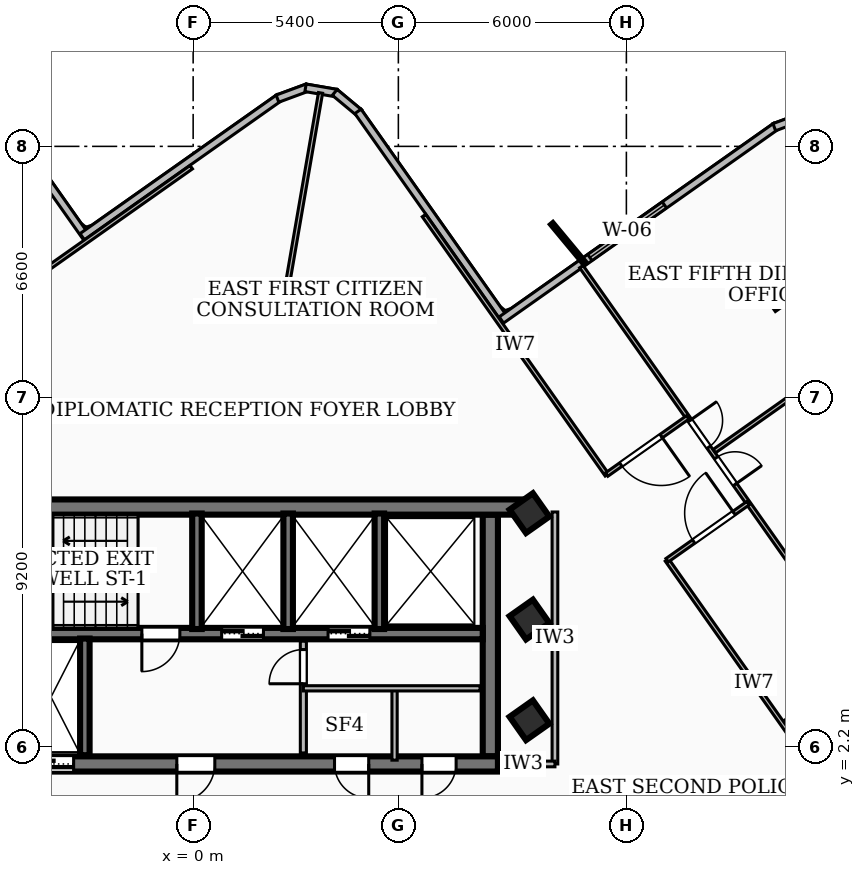
"""IFC4 building model, lengths in metres.
Left out: names, types, materials, properties, quantities, classifications, styles, units other than length and angle.
Written with IfcOpenShell. Run it as: python <this file> out.ifc"""

import sys

from ifc_helpers import new_model, si_unit, direction, frame, frame_2d, origin, origin_2d, place, context, subcontext, project, spatial, rectangle, i_section, extrude, element, fill, save


model = new_model("IFC4")
c1 = context("Model", 3, precision=1e-05, world=origin(), true_north=direction((0.0, 1.0)))
c2 = subcontext(c1, "Body", "Model", "MODEL_VIEW")
j1 = project(units=[si_unit("LENGTHUNIT", "METRE"), si_unit("PLANEANGLEUNIT", "RADIAN")], contexts=[c1])
p1 = place(None, origin())
s1 = spatial("IfcSite", under=j1, at=p1, CompositionType="ELEMENT")
p2 = place(p1, origin())
s2 = spatial("IfcBuilding", under=s1, at=p2, CompositionType="ELEMENT")
p3 = place(p2, frame((0.0, 0.0, 222.3)))
s3 = spatial("IfcBuildingStorey", under=s2, at=p3, CompositionType="ELEMENT", Elevation=222.3)
p4 = place(p3, frame((-8.78, 8.51, 0.0), z_axis=(0.0, 0.0, 1.0), x_axis=(1.0, 0.0, 0.0)))
e1 = element("IfcWall", 1, at=p4, inside=s3, PredefinedType="SHEAR", context=c2, shape_type="SweptSolid", body=[
    extrude(rectangle(XDim=17.56, YDim=0.4, at=frame_2d((8.78, 0.0))), origin(), (0.0, 0.0, 1.0), 3.14),
])
p5 = place(p3, frame((8.02, 1.75, 0.0), z_axis=(0.0, 0.0, 1.0), x_axis=(-1.0, 0.0, 0.0)))
e2 = element("IfcWall", 2, at=p5, inside=s3, PredefinedType="SHEAR", context=c2, shape_type="SweptSolid", body=[
    extrude(rectangle(XDim=16.04, YDim=0.4, at=frame_2d((8.02, 0.0))), origin(), (0.0, 0.0, 1.0), 3.14),
])
p6 = place(p5, frame((7.45, 0.0, 0.0)))
e3 = element("IfcOpeningElement", 3, at=p6, cuts=e2, PredefinedType="OPENING", context=c2, shape_type="SweptSolid", body=[
    extrude(rectangle(XDim=1.0, YDim=2.1, at=frame_2d((0.5, 1.05))), frame((0.0, 0.21, 0.0), z_axis=(0.0, -1.0, 0.0), x_axis=(1.0, 0.0, 0.0)), (0.0, 0.0, 1.0), 0.42),
])
p7 = place(p5, frame((14.285, 0.0, 0.0)))
e4 = element("IfcOpeningElement", 4, at=p7, cuts=e2, PredefinedType="OPENING", context=c2, shape_type="SweptSolid", body=[
    extrude(rectangle(XDim=1.05, YDim=2.15, at=frame_2d((0.525, 1.075))), frame((0.0, 0.21, 0.0), z_axis=(0.0, -1.0, 0.0), x_axis=(1.0, 0.0, 0.0)), (0.0, 0.0, 1.0), 0.42),
])
p8 = place(p5, frame((12.725, 0.0, 0.0)))
e5 = element("IfcOpeningElement", 5, at=p8, cuts=e2, PredefinedType="OPENING", context=c2, shape_type="SweptSolid", body=[
    extrude(rectangle(XDim=1.05, YDim=2.15, at=frame_2d((0.525, 1.075))), frame((0.0, 0.21, 0.0), z_axis=(0.0, -1.0, 0.0), x_axis=(1.0, 0.0, 0.0)), (0.0, 0.0, 1.0), 0.42),
])
p9 = place(p5, frame((11.165, 0.0, 0.0)))
e6 = element("IfcOpeningElement", 6, at=p9, cuts=e2, PredefinedType="OPENING", context=c2, shape_type="SweptSolid", body=[
    extrude(rectangle(XDim=1.05, YDim=2.15, at=frame_2d((0.525, 1.075))), frame((0.0, 0.21, 0.0), z_axis=(0.0, -1.0, 0.0), x_axis=(1.0, 0.0, 0.0)), (0.0, 0.0, 1.0), 0.42),
])
p10 = place(p5, frame((3.4, 0.0, 0.0)))
e7 = element("IfcOpeningElement", 7, at=p10, cuts=e2, PredefinedType="OPENING", context=c2, shape_type="SweptSolid", body=[
    extrude(rectangle(XDim=0.9, YDim=2.06, at=frame_2d((0.45, 1.03))), frame((0.0, 0.21, 0.0), z_axis=(0.0, -1.0, 0.0), x_axis=(1.0, 0.0, 0.0)), (0.0, 0.0, 1.0), 0.42),
])
p11 = place(p5, frame((1.1, 0.0, 0.0)))
e8 = element("IfcOpeningElement", 8, at=p11, cuts=e2, PredefinedType="OPENING", context=c2, shape_type="SweptSolid", body=[
    extrude(rectangle(XDim=0.9, YDim=2.06, at=frame_2d((0.45, 1.03))), frame((0.0, 0.21, 0.0), z_axis=(0.0, -1.0, 0.0), x_axis=(1.0, 0.0, 0.0)), (0.0, 0.0, 1.0), 0.42),
])
p12 = place(p3, frame((7.82, 8.31, 0.0), z_axis=(0.0, 0.0, 1.0), x_axis=(0.0, -1.0, 0.0)))
e9 = element("IfcWall", 9, at=p12, inside=s3, PredefinedType="SHEAR", context=c2, shape_type="SweptSolid", body=[
    extrude(rectangle(XDim=6.36, YDim=0.4, at=frame_2d((3.18, 0.0))), origin(), (0.0, 0.0, 1.0), 3.14),
])
p13 = place(p3, frame((7.62, 5.18, 0.0), z_axis=(0.0, 0.0, 1.0), x_axis=(-1.0, 0.0, 0.0)))
e10 = element("IfcWall", 10, at=p13, inside=s3, PredefinedType="SOLIDWALL", context=c2, shape_type="SweptSolid", body=[
    extrude(rectangle(XDim=15.24, YDim=0.3, at=frame_2d((7.62, 0.0))), origin(), (0.0, 0.0, 1.0), 3.14),
])
p14 = place(p13, frame((5.77, 0.0, 0.0)))
e11 = element("IfcOpeningElement", 11, at=p14, cuts=e10, PredefinedType="OPENING", context=c2, shape_type="SweptSolid", body=[
    extrude(rectangle(XDim=1.1, YDim=2.15, at=frame_2d((0.55, 1.075))), frame((0.0, 0.16, 0.0), z_axis=(0.0, -1.0, 0.0), x_axis=(1.0, 0.0, 0.0)), (0.0, 0.0, 1.0), 0.32),
])
p15 = place(p13, frame((2.97, 0.0, 0.0)))
e12 = element("IfcOpeningElement", 12, at=p15, cuts=e10, PredefinedType="OPENING", context=c2, shape_type="SweptSolid", body=[
    extrude(rectangle(XDim=1.1, YDim=2.15, at=frame_2d((0.55, 1.075))), frame((0.0, 0.16, 0.0), z_axis=(0.0, -1.0, 0.0), x_axis=(1.0, 0.0, 0.0)), (0.0, 0.0, 1.0), 0.32),
])
p16 = place(p13, frame((7.97, 0.0, 0.0)))
e13 = element("IfcOpeningElement", 13, at=p16, cuts=e10, PredefinedType="OPENING", context=c2, shape_type="SweptSolid", body=[
    extrude(rectangle(XDim=1.0, YDim=2.1, at=frame_2d((0.5, 1.05))), frame((0.0, 0.16, 0.0), z_axis=(0.0, -1.0, 0.0), x_axis=(1.0, 0.0, 0.0)), (0.0, 0.0, 1.0), 0.32),
])
for number, where, z_axis, x_axis in (
    (14, (0.1, 5.3, 0.0), (0.0, 0.0, 1.0), (0.0, 1.0, 0.0)),
    (15, (2.5, 5.3, 0.0), (0.0, 0.0, 1.0), (0.0, 1.0, 0.0)),
    (16, (4.9, 5.3, 0.0), (0.0, 0.0, 1.0), (0.0, 1.0, 0.0)),
):
    element("IfcWall", number, at=place(p3, frame(where, z_axis=z_axis, x_axis=x_axis)), inside=s3, PredefinedType="SOLIDWALL", context=c2, shape_type="SweptSolid", body=[
        extrude(rectangle(XDim=3.04, YDim=0.25, at=frame_2d((1.52, 0.0))), origin(), (0.0, 0.0, 1.0), 3.14),
    ])
p17 = place(p3, frame((-2.85, 1.98, 0.0), z_axis=(0.0, 0.0, 1.0), x_axis=(0.0, 1.0, 0.0)))
e17 = element("IfcWall", 17, at=p17, inside=s3, PredefinedType="SOLIDWALL", context=c2, shape_type="SweptSolid", body=[
    extrude(rectangle(XDim=3.07, YDim=0.25, at=frame_2d((1.535, 0.0))), origin(), (0.0, 0.0, 1.0), 3.14),
])
for number, where, z_axis, x_axis in (
    (18, (8.85, 2.9, 0.0), (0.0, 0.0, 1.0), (0.817, 0.576, 0.0)),
    (19, (8.85, 5.55, 0.0), (0.0, 0.0, 1.0), (0.817, 0.576, 0.0)),
    (20, (8.85, 8.35, 0.0), (0.0, 0.0, 1.0), (0.817, 0.576, 0.0)),
):
    element("IfcColumn", number, at=place(p3, frame(where, z_axis=z_axis, x_axis=x_axis)), inside=s3, PredefinedType="COLUMN", context=c2, shape_type="SweptSolid", body=[
        extrude(rectangle(XDim=0.75, YDim=0.75, at=origin_2d()), origin(), (0.0, 0.0, 1.0), 3.42),
    ])
p18 = place(p3, frame((15.234, 14.209, 0.0), z_axis=(0.0, 0.0, 1.0), x_axis=(0.817144898335, 0.57643231617, 0.0)))
e21 = element("IfcColumn", 21, at=p18, inside=s3, PredefinedType="COLUMN", context=c2, shape_type="SweptSolid", body=[
    extrude(i_section(OverallWidth=0.418, OverallDepth=0.927, WebThickness=0.019, FlangeThickness=0.032, at=origin_2d()), origin(), (0.0, 0.0, 1.0), 3.42),
])
p19 = place(p3, frame((-5.484, 19.397, 0.0), z_axis=(0.0, 0.0, 1.0), x_axis=(0.576451897958, -0.817131084551, 0.0)))
e22 = element("IfcWall", 22, at=p19, inside=s3, PredefinedType="SOLIDWALL", context=c2, shape_type="SweptSolid", body=[
    extrude(rectangle(XDim=4.642, YDim=0.2, at=frame_2d((2.321, 0.0))), origin(), (0.0, 0.0, 1.0), 3.14),
])
p20 = place(p3, frame((-2.919, 15.623, 0.0), z_axis=(0.0, 0.0, 1.0), x_axis=(0.817050016192, 0.576566796686, 0.0)))
e23 = element("IfcWall", 23, at=p20, inside=s3, PredefinedType="SOLIDWALL", context=c2, shape_type="SweptSolid", body=[
    extrude(rectangle(XDim=6.341, YDim=0.2, at=frame_2d((3.17, 0.0))), origin(), (0.0, 0.0, 1.0), 3.14),
])
p21 = place(p3, frame((2.219, 19.256, 0.0), z_axis=(0.0, 0.0, 1.0), x_axis=(0.938243551417, 0.345975487894, 0.0)))
e24 = element("IfcWall", 24, at=p21, inside=s3, PredefinedType="SOLIDWALL", context=c2, shape_type="SweptSolid", body=[
    extrude(rectangle(XDim=0.838, YDim=0.2, at=frame_2d((0.419, 0.0))), origin(), (0.0, 0.0, 1.0), 3.14),
])
p22 = place(p3, frame((2.957, 19.541, 0.0), z_axis=(0.0, 0.0, 1.0), x_axis=(0.985466949497, -0.169867275979, 0.0)))
e25 = element("IfcWall", 25, at=p22, inside=s3, PredefinedType="SOLIDWALL", context=c2, shape_type="SweptSolid", body=[
    extrude(rectangle(XDim=0.825, YDim=0.2, at=frame_2d((0.413, 0.0))), origin(), (0.0, 0.0, 1.0), 3.14),
])
p23 = place(p3, frame((3.726, 19.421, 0.0), z_axis=(0.0, 0.0, 1.0), x_axis=(0.768698761673, -0.639610986305, 0.0)))
e26 = element("IfcWall", 26, at=p23, inside=s3, PredefinedType="SOLIDWALL", context=c2, shape_type="SweptSolid", body=[
    extrude(rectangle(XDim=0.838, YDim=0.2, at=frame_2d((0.419, 0.0))), origin(), (0.0, 0.0, 1.0), 3.14),
])
p24 = place(p3, frame((4.337, 18.921, 0.0), z_axis=(0.0, 0.0, 1.0), x_axis=(0.576400163196, -0.817167578816, 0.0)))
e27 = element("IfcWall", 27, at=p24, inside=s3, PredefinedType="SOLIDWALL", context=c2, shape_type="SweptSolid", body=[
    extrude(rectangle(XDim=6.74, YDim=0.2, at=frame_2d((3.37, 0.0))), origin(), (0.0, 0.0, 1.0), 3.14),
])
p25 = place(p3, frame((8.111, 13.432, 0.0), z_axis=(0.0, 0.0, 1.0), x_axis=(0.81712855258, 0.576455487058, 0.0)))
e28 = element("IfcWall", 28, at=p25, inside=s3, PredefinedType="SOLIDWALL", context=c2, shape_type="SweptSolid", body=[
    extrude(rectangle(XDim=8.841, YDim=0.2, at=frame_2d((4.42, 0.0))), origin(), (0.0, 0.0, 1.0), 3.14),
])
p26 = place(p25, frame((2.85, 0.0, 0.85)))
e29 = element("IfcOpeningElement", 29, at=p26, cuts=e28, PredefinedType="OPENING", context=c2, shape_type="SweptSolid", body=[
    extrude(rectangle(XDim=2.4, YDim=1.85, at=frame_2d((1.2, 0.925))), frame((0.0, 0.11, 0.0), z_axis=(0.0, -1.0, 0.0), x_axis=(1.0, 0.0, 0.0)), (0.0, 0.0, 1.0), 0.22),
])
p27 = place(p3, frame((15.292, 18.505, 0.0), z_axis=(0.0, 0.0, 1.0), x_axis=(0.938148911857, 0.346232030844, 0.0)))
e30 = element("IfcWall", 30, at=p27, inside=s3, PredefinedType="SOLIDWALL", context=c2, shape_type="SweptSolid", body=[
    extrude(rectangle(XDim=0.838, YDim=0.2, at=frame_2d((0.419, 0.0))), origin(), (0.0, 0.0, 1.0), 3.14),
])
p28 = place(p3, frame((22.829, 7.905, 0.0), z_axis=(0.0, 0.0, 1.0), x_axis=(-0.817135410946, -0.576445765166, 0.0)))
e31 = element("IfcWall", 31, at=p28, inside=s3, PredefinedType="SOLIDWALL", context=c2, shape_type="SweptSolid", body=[
    extrude(rectangle(XDim=8.842, YDim=0.2, at=frame_2d((4.421, 0.0))), origin(), (0.0, 0.0, 1.0), 3.14),
])
p29 = place(p28, frame((0.85, 0.0, 0.85)))
e32 = element("IfcOpeningElement", 32, at=p29, cuts=e31, PredefinedType="OPENING", context=c2, shape_type="SweptSolid", body=[
    extrude(rectangle(XDim=1.5, YDim=1.5, at=frame_2d((0.75, 0.75))), frame((0.0, 0.11, 0.0), z_axis=(0.0, -1.0, 0.0), x_axis=(1.0, 0.0, 0.0)), (0.0, 0.0, 1.0), 0.22),
])
p30 = place(p3, frame((15.623, 2.919, 0.0), z_axis=(0.0, 0.0, 1.0), x_axis=(0.576566796686, -0.817050016192, 0.0)))
e33 = element("IfcWall", 33, at=p30, inside=s3, PredefinedType="SOLIDWALL", context=c2, shape_type="SweptSolid", body=[
    extrude(rectangle(XDim=6.341, YDim=0.2, at=frame_2d((3.17, 0.0))), origin(), (0.0, 0.0, 1.0), 3.14),
])
p31 = place(p3, frame((2.9, 2.04, 0.0), z_axis=(0.0, 0.0, 1.0), x_axis=(0.0, 1.0, 0.0)))
e34 = element("IfcWall", 34, at=p31, inside=s3, PredefinedType="PARTITIONING", context=c2, shape_type="SweptSolid", body=[
    extrude(rectangle(XDim=2.94, YDim=0.16, at=frame_2d((1.47, 0.0))), origin(), (0.0, 0.0, 1.0), 2.37),
])
p32 = place(p31, frame((1.82, 0.0, 0.0)))
e35 = element("IfcOpeningElement", 35, at=p32, cuts=e34, PredefinedType="OPENING", context=c2, shape_type="SweptSolid", body=[
    extrude(rectangle(XDim=0.9, YDim=2.06, at=frame_2d((0.45, 1.03))), frame((0.0, 0.09, 0.0), z_axis=(0.0, -1.0, 0.0), x_axis=(1.0, 0.0, 0.0)), (0.0, 0.0, 1.0), 0.18),
])
p33 = place(p3, frame((2.9, 3.74, 0.0), z_axis=(0.0, 0.0, 1.0), x_axis=(1.0, 0.0, 0.0)))
e36 = element("IfcWall", 36, at=p33, inside=s3, PredefinedType="PARTITIONING", context=c2, shape_type="SweptSolid", body=[
    extrude(rectangle(XDim=4.65, YDim=0.138, at=frame_2d((2.325, 0.0))), origin(), (0.0, 0.0, 1.0), 3.14),
])
p34 = place(p3, frame((5.3, 1.85, 0.0), z_axis=(0.0, 0.0, 1.0), x_axis=(0.0, 1.0, 0.0)))
e37 = element("IfcWall", 37, at=p34, inside=s3, PredefinedType="PARTITIONING", context=c2, shape_type="SweptSolid", body=[
    extrude(rectangle(XDim=1.89, YDim=0.138, at=frame_2d((0.945, 0.0))), origin(), (0.0, 0.0, 1.0), 2.37),
])
p35 = place(p3, frame((9.52, 1.75, 0.0), z_axis=(0.0, 0.0, 1.0), x_axis=(0.0, 1.0, 0.0)))
e38 = element("IfcWall", 38, at=p35, inside=s3, PredefinedType="PARTITIONING", context=c2, shape_type="SweptSolid", body=[
    extrude(rectangle(XDim=6.63, YDim=0.15, at=frame_2d((3.315, 0.0))), origin(), (0.0, 0.0, 1.0), 2.51),
])
p36 = place(p3, frame((7.85, 1.75, 0.0), z_axis=(0.0, 0.0, 1.0), x_axis=(1.0, 0.0, 0.0)))
e39 = element("IfcWall", 39, at=p36, inside=s3, PredefinedType="PARTITIONING", context=c2, shape_type="SweptSolid", body=[
    extrude(rectangle(XDim=1.67, YDim=0.15, at=frame_2d((0.835, 0.0))), origin(), (0.0, 0.0, 1.0), 2.37),
])
p37 = place(p3, frame((2.338, 13.54, 0.0), z_axis=(0.0, 0.0, 1.0), x_axis=(0.1703339471, 0.9853863945, 0.0)))
e40 = element("IfcWall", 40, at=p37, inside=s3, PredefinedType="PARTITIONING", context=c2, shape_type="SweptSolid", body=[
    extrude(rectangle(XDim=5.954, YDim=0.11, at=frame_2d((2.977, 0.0))), origin(), (0.0, 0.0, 1.0), 3.14),
])
p38 = place(p3, frame((10.887, 9.357, 0.0), z_axis=(0.0, 0.0, 1.0), x_axis=(-0.576423728743, 0.817150956031, 0.0)))
e41 = element("IfcWall", 41, at=p38, inside=s3, PredefinedType="PARTITIONING", context=c2, shape_type="SweptSolid", body=[
    extrude(rectangle(XDim=8.35, YDim=0.11, at=frame_2d((4.175, 0.0))), origin(), (0.0, 0.0, 1.0), 2.51),
])
p39 = place(p3, frame((17.049, 0.621, 0.0), z_axis=(0.0, 0.0, 1.0), x_axis=(-0.57635038395, 0.817202689007, 0.0)))
e42 = element("IfcWall", 42, at=p39, inside=s3, PredefinedType="PARTITIONING", context=c2, shape_type="SweptSolid", body=[
    extrude(rectangle(XDim=7.95, YDim=0.11, at=frame_2d((3.975, 0.0))), origin(), (0.0, 0.0, 1.0), 3.14),
])
p40 = place(p3, frame((13.014, 10.869, 0.0), z_axis=(0.0, 0.0, 1.0), x_axis=(-0.817133808286, -0.576448036995, 0.0)))
e43 = element("IfcWall", 43, at=p40, inside=s3, PredefinedType="PARTITIONING", context=c2, shape_type="SweptSolid", body=[
    extrude(rectangle(XDim=2.609, YDim=0.11, at=frame_2d((1.304, 0.0))), origin(), (0.0, 0.0, 1.0), 3.14),
])
p41 = place(p40, frame((0.854, 0.0, 0.0)))
e44 = element("IfcOpeningElement", 44, at=p41, cuts=e43, PredefinedType="OPENING", context=c2, shape_type="SweptSolid", body=[
    extrude(rectangle(XDim=1.3, YDim=2.1, at=frame_2d((0.65, 1.05))), frame((0.0, 0.065, 0.0), z_axis=(0.0, -1.0, 0.0), x_axis=(1.0, 0.0, 0.0)), (0.0, 0.0, 1.0), 0.13),
])
p42 = place(p3, frame((12.472, 7.11, 0.0), z_axis=(0.0, 0.0, 1.0), x_axis=(0.81728919746, 0.576227704745, 0.0)))
e45 = element("IfcWall", 45, at=p42, inside=s3, PredefinedType="PARTITIONING", context=c2, shape_type="SweptSolid", body=[
    extrude(rectangle(XDim=2.61, YDim=0.11, at=frame_2d((1.305, 0.0))), origin(), (0.0, 0.0, 1.0), 3.14),
])
p43 = place(p42, frame((0.855, 0.0, 0.0)))
e46 = element("IfcOpeningElement", 46, at=p43, cuts=e45, PredefinedType="OPENING", context=c2, shape_type="SweptSolid", body=[
    extrude(rectangle(XDim=1.3, YDim=2.1, at=frame_2d((0.65, 1.05))), frame((0.0, 0.065, 0.0), z_axis=(0.0, -1.0, 0.0), x_axis=(1.0, 0.0, 0.0)), (0.0, 0.0, 1.0), 0.13),
])
p44 = place(p3, frame((13.715, 9.981, 0.0), z_axis=(0.0, 0.0, 1.0), x_axis=(0.817122118381, 0.576464607459, 0.0)))
e47 = element("IfcWall", 47, at=p44, inside=s3, PredefinedType="PARTITIONING", context=c2, shape_type="SweptSolid", body=[
    extrude(rectangle(XDim=7.675, YDim=0.11, at=frame_2d((3.837, 0.0))), origin(), (0.0, 0.0, 1.0), 3.14),
])
p45 = place(p3, frame((10.215, 14.836, 0.0), z_axis=(0.0, 0.0, 1.0), x_axis=(0.576525296339, -0.817079300118, 0.0)))
e48 = element("IfcWall", 48, at=p45, inside=s3, PredefinedType="PARTITIONING", context=c2, shape_type="SweptSolid", body=[
    extrude(rectangle(XDim=12.87, YDim=0.11, at=frame_2d((6.435, 0.0))), origin(), (0.0, 0.0, 1.0), 2.51),
])
p46 = place(p45, frame((6.155, 0.0, 0.0)))
e49 = element("IfcOpeningElement", 49, at=p46, cuts=e48, PredefinedType="OPENING", context=c2, shape_type="SweptSolid", body=[
    extrude(rectangle(XDim=0.86, YDim=2.04, at=frame_2d((0.43, 1.02))), frame((0.0, 0.065, 0.0), z_axis=(0.0, -1.0, 0.0), x_axis=(1.0, 0.0, 0.0)), (0.0, 0.0, 1.0), 0.13),
])
p47 = place(p45, frame((4.955, 0.0, 0.0)))
e50 = element("IfcOpeningElement", 50, at=p47, cuts=e48, PredefinedType="OPENING", context=c2, shape_type="SweptSolid", body=[
    extrude(rectangle(XDim=0.86, YDim=2.04, at=frame_2d((0.43, 1.02))), frame((0.0, 0.065, 0.0), z_axis=(0.0, -1.0, 0.0), x_axis=(1.0, 0.0, 0.0)), (0.0, 0.0, 1.0), 0.13),
])
p48 = place(p3, frame((-16.752, 5.671, 0.0), z_axis=(0.0, 0.0, 1.0), x_axis=(0.81715881447, 0.576412588285, 0.0)))
e51 = element("IfcWall", 51, at=p48, inside=s3, PredefinedType="PARTITIONING", context=c2, shape_type="SweptSolid", body=[
    extrude(rectangle(XDim=20.44, YDim=0.11, at=frame_2d((10.22, 0.0))), origin(), (0.0, 0.0, 1.0), 2.51),
])
p49 = place(p48, frame((9.82, 0.0, 0.0)))
e52 = element("IfcOpeningElement", 52, at=p49, cuts=e51, PredefinedType="OPENING", context=c2, shape_type="SweptSolid", body=[
    extrude(rectangle(XDim=1.2, YDim=2.1, at=frame_2d((0.6, 1.05))), frame((0.0, 0.065, 0.0), z_axis=(0.0, -1.0, 0.0), x_axis=(1.0, 0.0, 0.0)), (0.0, 0.0, 1.0), 0.13),
])
p50 = place(p26, origin())
e53 = element("IfcWindow", 53, at=p50, inside=s3, PartitioningType="SINGLE_PANEL", PredefinedType="WINDOW", context=c2, shape_type="SweptSolid", body=[
    extrude(rectangle(XDim=2.4, YDim=1.85, at=frame_2d((1.2, 0.925))), frame((0.0, 0.03, 0.0), z_axis=(0.0, -1.0, 0.0), x_axis=(1.0, 0.0, 0.0)), (0.0, 0.0, 1.0), 0.06),
])
fill(e29, e53)
p51 = place(p6, origin())
e54 = element("IfcDoor", 54, at=p51, inside=s3, OperationType="SINGLE_SWING_RIGHT", PredefinedType="DOOR", context=c2, shape_type="SweptSolid", body=[
    extrude(rectangle(XDim=1.0, YDim=2.1, at=frame_2d((0.5, 1.05))), frame((0.0, 0.025, 0.0), z_axis=(0.0, -1.0, 0.0), x_axis=(1.0, 0.0, 0.0)), (0.0, 0.0, 1.0), 0.05),
])
fill(e3, e54)
p52 = place(p14, origin())
e55 = element("IfcDoor", 55, at=p52, inside=s3, OperationType="DOUBLE_DOOR_SLIDING", PredefinedType="DOOR", context=c2, shape_type="SweptSolid", body=[
    extrude(rectangle(XDim=1.1, YDim=2.15, at=frame_2d((0.55, 1.075))), frame((0.0, 0.025, 0.0), z_axis=(0.0, -1.0, 0.0), x_axis=(1.0, 0.0, 0.0)), (0.0, 0.0, 1.0), 0.05),
])
fill(e11, e55)
p53 = place(p15, origin())
e56 = element("IfcDoor", 56, at=p53, inside=s3, OperationType="DOUBLE_DOOR_SLIDING", PredefinedType="DOOR", context=c2, shape_type="SweptSolid", body=[
    extrude(rectangle(XDim=1.1, YDim=2.15, at=frame_2d((0.55, 1.075))), frame((0.0, 0.025, 0.0), z_axis=(0.0, -1.0, 0.0), x_axis=(1.0, 0.0, 0.0)), (0.0, 0.0, 1.0), 0.05),
])
fill(e12, e56)
p54 = place(p16, origin())
e57 = element("IfcDoor", 57, at=p54, inside=s3, OperationType="SINGLE_SWING_RIGHT", PredefinedType="DOOR", context=c2, shape_type="SweptSolid", body=[
    extrude(rectangle(XDim=1.0, YDim=2.1, at=frame_2d((0.5, 1.05))), frame((0.0, 0.025, 0.0), z_axis=(0.0, -1.0, 0.0), x_axis=(1.0, 0.0, 0.0)), (0.0, 0.0, 1.0), 0.05),
])
fill(e13, e57)
p55 = place(p9, origin())
e58 = element("IfcDoor", 58, at=p55, inside=s3, OperationType="DOUBLE_DOOR_SLIDING", PredefinedType="DOOR", context=c2, shape_type="SweptSolid", body=[
    extrude(rectangle(XDim=1.05, YDim=2.15, at=frame_2d((0.525, 1.075))), frame((0.0, 0.025, 0.0), z_axis=(0.0, -1.0, 0.0), x_axis=(1.0, 0.0, 0.0)), (0.0, 0.0, 1.0), 0.05),
])
fill(e6, e58)
p56 = place(p10, origin())
e59 = element("IfcDoor", 59, at=p56, inside=s3, OperationType="SINGLE_SWING_LEFT", PredefinedType="DOOR", context=c2, shape_type="SweptSolid", body=[
    extrude(rectangle(XDim=0.9, YDim=2.06, at=frame_2d((0.45, 1.03))), frame((0.0, 0.025, 0.0), z_axis=(0.0, -1.0, 0.0), x_axis=(1.0, 0.0, 0.0)), (0.0, 0.0, 1.0), 0.05),
])
fill(e7, e59)
p57 = place(p11, origin())
e60 = element("IfcDoor", 60, at=p57, inside=s3, OperationType="SINGLE_SWING_RIGHT", PredefinedType="DOOR", context=c2, shape_type="SweptSolid", body=[
    extrude(rectangle(XDim=0.9, YDim=2.06, at=frame_2d((0.45, 1.03))), frame((0.0, 0.025, 0.0), z_axis=(0.0, -1.0, 0.0), x_axis=(1.0, 0.0, 0.0)), (0.0, 0.0, 1.0), 0.05),
])
fill(e8, e60)
p58 = place(p32, origin())
e61 = element("IfcDoor", 61, at=p58, inside=s3, OperationType="SINGLE_SWING_LEFT", PredefinedType="DOOR", context=c2, shape_type="SweptSolid", body=[
    extrude(rectangle(XDim=0.9, YDim=2.06, at=frame_2d((0.45, 1.03))), frame((0.0, 0.025, 0.0), z_axis=(0.0, -1.0, 0.0), x_axis=(1.0, 0.0, 0.0)), (0.0, 0.0, 1.0), 0.05),
])
fill(e35, e61)
p59 = place(p41, origin())
e62 = element("IfcDoor", 62, at=p59, inside=s3, OperationType="SINGLE_SWING_LEFT", PredefinedType="DOOR", context=c2, shape_type="SweptSolid", body=[
    extrude(rectangle(XDim=1.3, YDim=2.1, at=frame_2d((0.65, 1.05))), frame((0.0, 0.025, 0.0), z_axis=(0.0, -1.0, 0.0), x_axis=(1.0, 0.0, 0.0)), (0.0, 0.0, 1.0), 0.05),
])
fill(e44, e62)
p60 = place(p43, origin())
e63 = element("IfcDoor", 63, at=p60, inside=s3, OperationType="SINGLE_SWING_RIGHT", PredefinedType="DOOR", context=c2, shape_type="SweptSolid", body=[
    extrude(rectangle(XDim=1.3, YDim=2.1, at=frame_2d((0.65, 1.05))), frame((0.0, 0.025, 0.0), z_axis=(0.0, -1.0, 0.0), x_axis=(1.0, 0.0, 0.0)), (0.0, 0.0, 1.0), 0.05),
])
fill(e46, e63)
p61 = place(p46, origin())
e64 = element("IfcDoor", 64, at=p61, inside=s3, OperationType="SINGLE_SWING_RIGHT", PredefinedType="DOOR", context=c2, shape_type="SweptSolid", body=[
    extrude(rectangle(XDim=0.86, YDim=2.04, at=frame_2d((0.43, 1.02))), frame((0.0, 0.025, 0.0), z_axis=(0.0, -1.0, 0.0), x_axis=(1.0, 0.0, 0.0)), (0.0, 0.0, 1.0), 0.05),
])
fill(e49, e64)
p62 = place(p47, origin())
e65 = element("IfcDoor", 65, at=p62, inside=s3, OperationType="SINGLE_SWING_LEFT", PredefinedType="DOOR", context=c2, shape_type="SweptSolid", body=[
    extrude(rectangle(XDim=0.86, YDim=2.04, at=frame_2d((0.43, 1.02))), frame((0.0, 0.025, 0.0), z_axis=(0.0, -1.0, 0.0), x_axis=(1.0, 0.0, 0.0)), (0.0, 0.0, 1.0), 0.05),
])
fill(e50, e65)
save(model, sys.argv[1])
